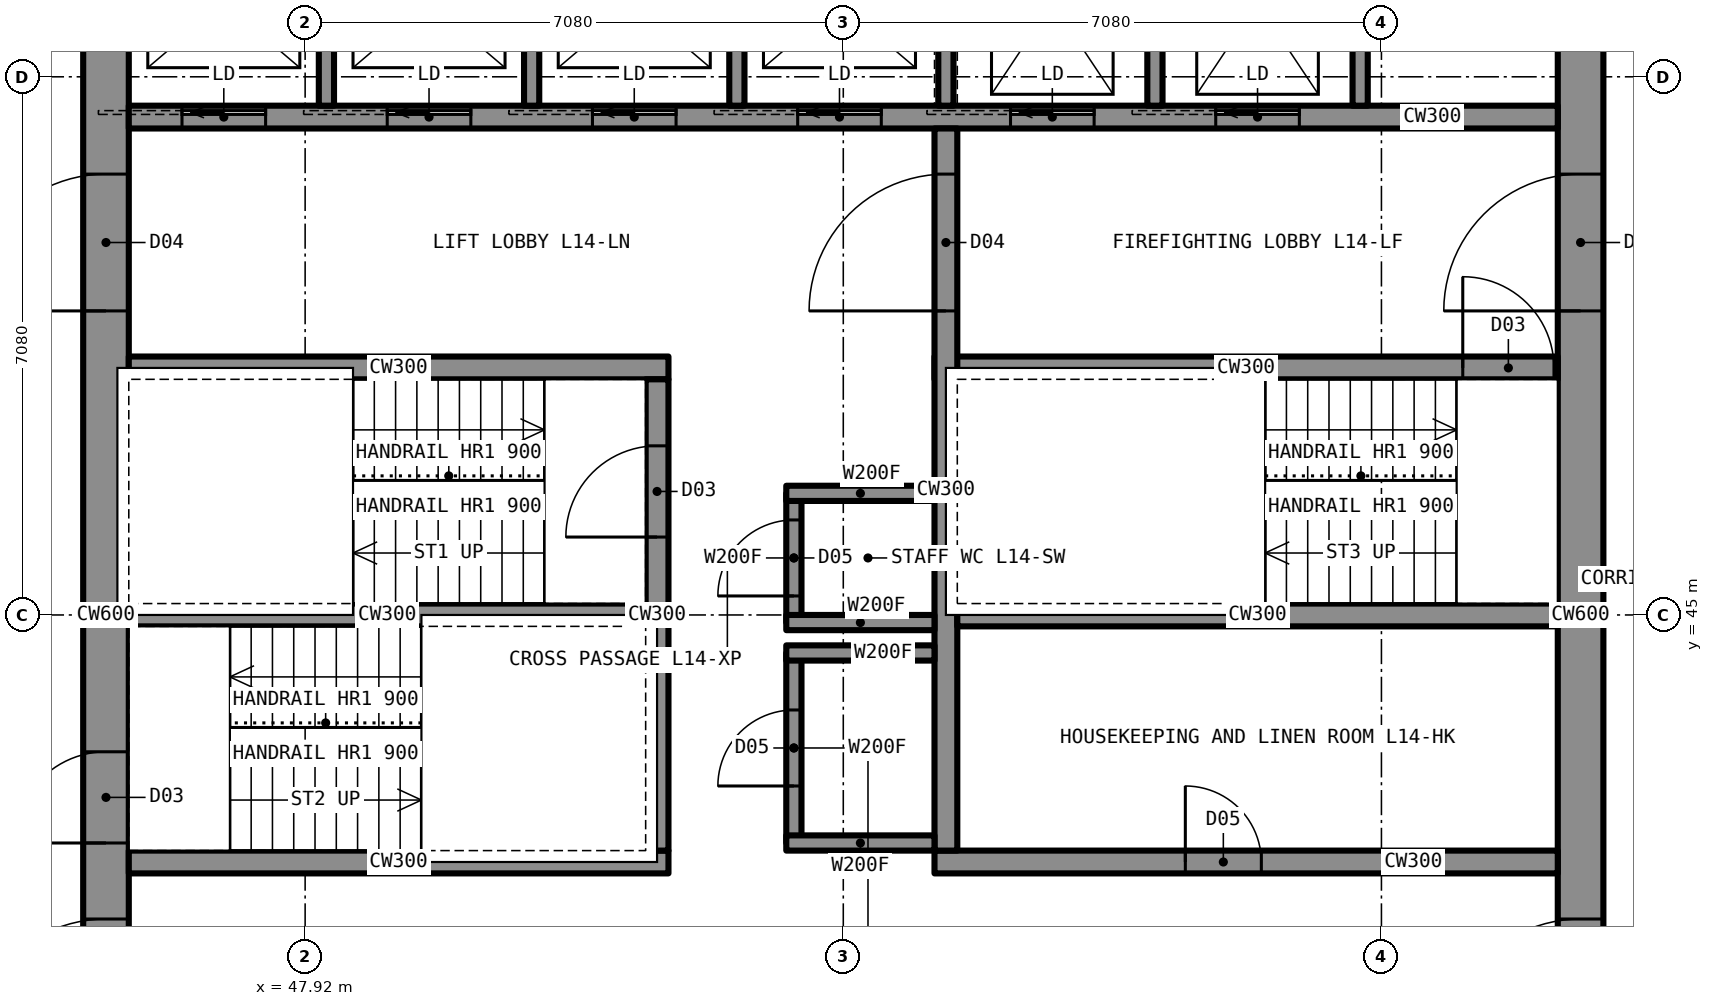
"""IFC4 building model, lengths in metres.
Left out: names, types, materials, properties, quantities, classifications, styles, units other than length and angle.
Written with IfcOpenShell. Run it as: python <this file> out.ifc"""

import sys

from ifc_helpers import new_model, si_unit, direction, frame, frame_2d, origin, place, context, subcontext, project, spatial, rectangle, extrude, element, fill, save


model = new_model("IFC4")
c1 = context("Model", 3, precision=1e-05, world=origin(), true_north=direction((0.0, 1.0)))
c2 = subcontext(c1, "Body", "Model", "MODEL_VIEW")
j1 = project(units=[si_unit("LENGTHUNIT", "METRE"), si_unit("PLANEANGLEUNIT", "RADIAN")], contexts=[c1])
p1 = place(None, origin())
s1 = spatial("IfcSite", under=j1, at=p1, CompositionType="ELEMENT")
p2 = place(p1, origin())
s2 = spatial("IfcBuilding", under=s1, at=p2, CompositionType="ELEMENT")
p3 = place(p2, frame((0.0, 0.0, 49.5)))
s3 = spatial("IfcBuildingStorey", under=s2, at=p3, CompositionType="ELEMENT", Elevation=49.5)
p4 = place(p3, frame((64.7, 35.6, 0.0), z_axis=(0.0, 0.0, 1.0), x_axis=(0.0, 1.0, 0.0)))
e1 = element("IfcWall", 1, at=p4, inside=s3, PredefinedType="SHEAR", context=c2, shape_type="SweptSolid", body=[
    extrude(rectangle(XDim=18.8, YDim=0.6, at=frame_2d((9.4, 0.0))), origin(), (0.0, 0.0, 1.0), 3.5),
])
p5 = place(p4, frame((13.4, 0.0, 0.0)))
e2 = element("IfcOpeningElement", 2, at=p5, cuts=e1, PredefinedType="OPENING", context=c2, shape_type="SweptSolid", body=[
    extrude(rectangle(XDim=1.8, YDim=2.2, at=frame_2d((0.9, 1.1))), frame((0.0, 0.31, 0.0), z_axis=(0.0, -1.0, 0.0), x_axis=(1.0, 0.0, 0.0)), (0.0, 0.0, 1.0), 0.62),
])
p6 = place(p4, frame((3.6, 0.0, 0.0)))
e3 = element("IfcOpeningElement", 3, at=p6, cuts=e1, PredefinedType="OPENING", context=c2, shape_type="SweptSolid", body=[
    extrude(rectangle(XDim=1.8, YDim=2.2, at=frame_2d((0.9, 1.1))), frame((0.0, 0.31, 0.0), z_axis=(0.0, -1.0, 0.0), x_axis=(1.0, 0.0, 0.0)), (0.0, 0.0, 1.0), 0.62),
])
p7 = place(p3, frame((45.3, 35.6, 0.0), z_axis=(0.0, 0.0, 1.0), x_axis=(0.0, 1.0, 0.0)))
e4 = element("IfcWall", 4, at=p7, inside=s3, PredefinedType="SHEAR", context=c2, shape_type="SweptSolid", body=[
    extrude(rectangle(XDim=18.8, YDim=0.6, at=frame_2d((9.4, 0.0))), origin(), (0.0, 0.0, 1.0), 3.5),
])
p8 = place(p7, frame((13.4, 0.0, 0.0)))
e5 = element("IfcOpeningElement", 5, at=p8, cuts=e4, PredefinedType="OPENING", context=c2, shape_type="SweptSolid", body=[
    extrude(rectangle(XDim=1.8, YDim=2.2, at=frame_2d((0.9, 1.1))), frame((0.0, 0.31, 0.0), z_axis=(0.0, -1.0, 0.0), x_axis=(1.0, 0.0, 0.0)), (0.0, 0.0, 1.0), 0.62),
])
p9 = place(p7, frame((3.6, 0.0, 0.0)))
e6 = element("IfcOpeningElement", 6, at=p9, cuts=e4, PredefinedType="OPENING", context=c2, shape_type="SweptSolid", body=[
    extrude(rectangle(XDim=1.8, YDim=2.2, at=frame_2d((0.9, 1.1))), frame((0.0, 0.31, 0.0), z_axis=(0.0, -1.0, 0.0), x_axis=(1.0, 0.0, 0.0)), (0.0, 0.0, 1.0), 0.62),
])
p10 = place(p7, frame((6.4, 0.0, 0.0)))
e7 = element("IfcOpeningElement", 7, at=p10, cuts=e4, PredefinedType="OPENING", context=c2, shape_type="SweptSolid", body=[
    extrude(rectangle(XDim=1.2, YDim=2.2, at=frame_2d((0.6, 1.1))), frame((0.0, 0.31, 0.0), z_axis=(0.0, -1.0, 0.0), x_axis=(1.0, 0.0, 0.0)), (0.0, 0.0, 1.0), 0.62),
])
p11 = place(p3, frame((45.6, 51.55, 0.0), z_axis=(0.0, 0.0, 1.0), x_axis=(1.0, 0.0, 0.0)))
e8 = element("IfcWall", 8, at=p11, inside=s3, PredefinedType="SHEAR", context=c2, shape_type="SweptSolid", body=[
    extrude(rectangle(XDim=18.8, YDim=0.3, at=frame_2d((9.4, 0.0))), origin(), (0.0, 0.0, 1.0), 3.5),
])
p12 = place(p11, frame((0.7, 0.0, 0.0)))
e9 = element("IfcOpeningElement", 9, at=p12, cuts=e8, PredefinedType="OPENING", context=c2, shape_type="SweptSolid", body=[
    extrude(rectangle(XDim=1.1, YDim=2.2, at=frame_2d((0.55, 1.1))), frame((0.0, 0.16, 0.0), z_axis=(0.0, -1.0, 0.0), x_axis=(1.0, 0.0, 0.0)), (0.0, 0.0, 1.0), 0.32),
])
p13 = place(p11, frame((3.4, 0.0, 0.0)))
e10 = element("IfcOpeningElement", 10, at=p13, cuts=e8, PredefinedType="OPENING", context=c2, shape_type="SweptSolid", body=[
    extrude(rectangle(XDim=1.1, YDim=2.2, at=frame_2d((0.55, 1.1))), frame((0.0, 0.16, 0.0), z_axis=(0.0, -1.0, 0.0), x_axis=(1.0, 0.0, 0.0)), (0.0, 0.0, 1.0), 0.32),
])
p14 = place(p11, frame((6.1, 0.0, 0.0)))
e11 = element("IfcOpeningElement", 11, at=p14, cuts=e8, PredefinedType="OPENING", context=c2, shape_type="SweptSolid", body=[
    extrude(rectangle(XDim=1.1, YDim=2.2, at=frame_2d((0.55, 1.1))), frame((0.0, 0.16, 0.0), z_axis=(0.0, -1.0, 0.0), x_axis=(1.0, 0.0, 0.0)), (0.0, 0.0, 1.0), 0.32),
])
p15 = place(p11, frame((8.8, 0.0, 0.0)))
e12 = element("IfcOpeningElement", 12, at=p15, cuts=e8, PredefinedType="OPENING", context=c2, shape_type="SweptSolid", body=[
    extrude(rectangle(XDim=1.1, YDim=2.2, at=frame_2d((0.55, 1.1))), frame((0.0, 0.16, 0.0), z_axis=(0.0, -1.0, 0.0), x_axis=(1.0, 0.0, 0.0)), (0.0, 0.0, 1.0), 0.32),
])
p16 = place(p11, frame((11.6, 0.0, 0.0)))
e13 = element("IfcOpeningElement", 13, at=p16, cuts=e8, PredefinedType="OPENING", context=c2, shape_type="SweptSolid", body=[
    extrude(rectangle(XDim=1.1, YDim=2.2, at=frame_2d((0.55, 1.1))), frame((0.0, 0.16, 0.0), z_axis=(0.0, -1.0, 0.0), x_axis=(1.0, 0.0, 0.0)), (0.0, 0.0, 1.0), 0.32),
])
p17 = place(p11, frame((14.3, 0.0, 0.0)))
e14 = element("IfcOpeningElement", 14, at=p17, cuts=e8, PredefinedType="OPENING", context=c2, shape_type="SweptSolid", body=[
    extrude(rectangle(XDim=1.1, YDim=2.2, at=frame_2d((0.55, 1.1))), frame((0.0, 0.16, 0.0), z_axis=(0.0, -1.0, 0.0), x_axis=(1.0, 0.0, 0.0)), (0.0, 0.0, 1.0), 0.32),
])
p18 = place(p3, frame((45.6, 48.25, 0.0), z_axis=(0.0, 0.0, 1.0), x_axis=(1.0, 0.0, 0.0)))
e15 = element("IfcWall", 15, at=p18, inside=s3, PredefinedType="SHEAR", context=c2, shape_type="SweptSolid", body=[
    extrude(rectangle(XDim=7.1, YDim=0.3, at=frame_2d((3.55, 0.0))), origin(), (0.0, 0.0, 1.0), 3.5),
])
p19 = place(p3, frame((56.2, 48.25, 0.0), z_axis=(0.0, 0.0, 1.0), x_axis=(1.0, 0.0, 0.0)))
e16 = element("IfcWall", 16, at=p19, inside=s3, PredefinedType="SHEAR", context=c2, shape_type="SweptSolid", body=[
    extrude(rectangle(XDim=8.2, YDim=0.3, at=frame_2d((4.1, 0.0))), origin(), (0.0, 0.0, 1.0), 3.5),
])
p20 = place(p19, frame((6.95, 0.0, 0.0)))
e17 = element("IfcOpeningElement", 17, at=p20, cuts=e16, PredefinedType="OPENING", context=c2, shape_type="SweptSolid", body=[
    extrude(rectangle(XDim=1.2, YDim=2.2, at=frame_2d((0.6, 1.1))), frame((0.0, 0.16, 0.0), z_axis=(0.0, -1.0, 0.0), x_axis=(1.0, 0.0, 0.0)), (0.0, 0.0, 1.0), 0.32),
])
p21 = place(p3, frame((45.6, 41.75, 0.0), z_axis=(0.0, 0.0, 1.0), x_axis=(1.0, 0.0, 0.0)))
e18 = element("IfcWall", 18, at=p21, inside=s3, PredefinedType="SHEAR", context=c2, shape_type="SweptSolid", body=[
    extrude(rectangle(XDim=7.1, YDim=0.3, at=frame_2d((3.55, 0.0))), origin(), (0.0, 0.0, 1.0), 3.5),
])
p22 = place(p3, frame((56.2, 41.75, 0.0), z_axis=(0.0, 0.0, 1.0), x_axis=(1.0, 0.0, 0.0)))
e19 = element("IfcWall", 19, at=p22, inside=s3, PredefinedType="SHEAR", context=c2, shape_type="SweptSolid", body=[
    extrude(rectangle(XDim=8.2, YDim=0.3, at=frame_2d((4.1, 0.0))), origin(), (0.0, 0.0, 1.0), 3.5),
])
p23 = place(p22, frame((3.3, 0.0, 0.0)))
e20 = element("IfcOpeningElement", 20, at=p23, cuts=e19, PredefinedType="OPENING", context=c2, shape_type="SweptSolid", body=[
    extrude(rectangle(XDim=1.0, YDim=2.1, at=frame_2d((0.5, 1.05))), frame((0.0, 0.16, 0.0), z_axis=(0.0, -1.0, 0.0), x_axis=(1.0, 0.0, 0.0)), (0.0, 0.0, 1.0), 0.32),
])
p24 = place(p3, frame((52.55, 41.9, 0.0), z_axis=(0.0, 0.0, 1.0), x_axis=(0.0, 1.0, 0.0)))
e21 = element("IfcWall", 21, at=p24, inside=s3, PredefinedType="SHEAR", context=c2, shape_type="SweptSolid", body=[
    extrude(rectangle(XDim=6.2, YDim=0.3, at=frame_2d((3.1, 0.0))), origin(), (0.0, 0.0, 1.0), 3.5),
])
p25 = place(p24, frame((4.125, 0.0, 0.0)))
e22 = element("IfcOpeningElement", 22, at=p25, cuts=e21, PredefinedType="OPENING", context=c2, shape_type="SweptSolid", body=[
    extrude(rectangle(XDim=1.2, YDim=2.2, at=frame_2d((0.6, 1.1))), frame((0.0, 0.16, 0.0), z_axis=(0.0, -1.0, 0.0), x_axis=(1.0, 0.0, 0.0)), (0.0, 0.0, 1.0), 0.32),
])
p26 = place(p3, frame((56.35, 41.9, 0.0), z_axis=(0.0, 0.0, 1.0), x_axis=(0.0, 1.0, 0.0)))
e23 = element("IfcWall", 23, at=p26, inside=s3, PredefinedType="SHEAR", context=c2, shape_type="SweptSolid", body=[
    extrude(rectangle(XDim=9.5, YDim=0.3, at=frame_2d((4.75, 0.0))), origin(), (0.0, 0.0, 1.0), 3.5),
])
p27 = place(p26, frame((7.1, 0.0, 0.0)))
e24 = element("IfcOpeningElement", 24, at=p27, cuts=e23, PredefinedType="OPENING", context=c2, shape_type="SweptSolid", body=[
    extrude(rectangle(XDim=1.8, YDim=2.2, at=frame_2d((0.9, 1.1))), frame((0.0, 0.16, 0.0), z_axis=(0.0, -1.0, 0.0), x_axis=(1.0, 0.0, 0.0)), (0.0, 0.0, 1.0), 0.32),
])
p28 = place(p3, frame((45.6, 45.0, 0.0), z_axis=(0.0, 0.0, 1.0), x_axis=(1.0, 0.0, 0.0)))
e25 = element("IfcWall", 25, at=p28, inside=s3, PredefinedType="SHEAR", context=c2, shape_type="SweptSolid", body=[
    extrude(rectangle(XDim=6.8, YDim=0.3, at=frame_2d((3.4, 0.0))), origin(), (0.0, 0.0, 1.0), 3.5),
])
p29 = place(p3, frame((56.5, 45.0, 0.0), z_axis=(0.0, 0.0, 1.0), x_axis=(1.0, 0.0, 0.0)))
e26 = element("IfcWall", 26, at=p29, inside=s3, PredefinedType="SHEAR", context=c2, shape_type="SweptSolid", body=[
    extrude(rectangle(XDim=7.9, YDim=0.3, at=frame_2d((3.95, 0.0))), origin(), (0.0, 0.0, 1.0), 3.5),
])
p30 = place(p3, frame((54.65, 42.0, 0.0), z_axis=(0.0, 0.0, 1.0), x_axis=(0.0, 1.0, 0.0)))
e27 = element("IfcWall", 27, at=p30, inside=s3, PredefinedType="PARTITIONING", context=c2, shape_type="SweptSolid", body=[
    extrude(rectangle(XDim=1.3, YDim=0.2, at=frame_2d((0.65, 0.0))), origin(), (0.0, 0.0, 1.0), 3.33),
])
p31 = place(p30, frame((0.15, 0.0, 0.0)))
e28 = element("IfcOpeningElement", 28, at=p31, cuts=e27, PredefinedType="OPENING", context=c2, shape_type="SweptSolid", body=[
    extrude(rectangle(XDim=1.0, YDim=2.1, at=frame_2d((0.5, 1.05))), frame((0.0, 0.11, 0.0), z_axis=(0.0, -1.0, 0.0), x_axis=(1.0, 0.0, 0.0)), (0.0, 0.0, 1.0), 0.22),
])
for number, where, z_axis, x_axis in (
    (29, (54.55, 42.0, 0.0), (0.0, 0.0, 1.0), (1.0, 0.0, 0.0)),
    (30, (54.55, 43.3, 0.0), (0.0, 0.0, 1.0), (1.0, 0.0, 0.0)),
):
    element("IfcWall", number, at=place(p3, frame(where, z_axis=z_axis, x_axis=x_axis)), inside=s3, PredefinedType="PARTITIONING", context=c2, shape_type="SweptSolid", body=[
        extrude(rectangle(XDim=1.65, YDim=0.2, at=frame_2d((0.825, 0.0))), origin(), (0.0, 0.0, 1.0), 3.33),
    ])
p32 = place(p3, frame((54.65, 43.7, 0.0), z_axis=(0.0, 0.0, 1.0), x_axis=(0.0, 1.0, 0.0)))
e31 = element("IfcWall", 31, at=p32, inside=s3, PredefinedType="PARTITIONING", context=c2, shape_type="SweptSolid", body=[
    extrude(rectangle(XDim=2.2, YDim=0.2, at=frame_2d((1.1, 0.0))), origin(), (0.0, 0.0, 1.0), 3.33),
])
p33 = place(p32, frame((0.6, 0.0, 0.0)))
e32 = element("IfcOpeningElement", 32, at=p33, cuts=e31, PredefinedType="OPENING", context=c2, shape_type="SweptSolid", body=[
    extrude(rectangle(XDim=1.0, YDim=2.1, at=frame_2d((0.5, 1.05))), frame((0.0, 0.11, 0.0), z_axis=(0.0, -1.0, 0.0), x_axis=(1.0, 0.0, 0.0)), (0.0, 0.0, 1.0), 0.22),
])
for number, where, z_axis, x_axis in (
    (33, (54.55, 43.7, 0.0), (0.0, 0.0, 1.0), (1.0, 0.0, 0.0)),
    (34, (54.55, 45.9, 0.0), (0.0, 0.0, 1.0), (1.0, 0.0, 0.0)),
):
    element("IfcWall", number, at=place(p3, frame(where, z_axis=z_axis, x_axis=x_axis)), inside=s3, PredefinedType="PARTITIONING", context=c2, shape_type="SweptSolid", body=[
        extrude(rectangle(XDim=1.65, YDim=0.2, at=frame_2d((0.825, 0.0))), origin(), (0.0, 0.0, 1.0), 3.33),
    ])
p34 = place(p3, frame((54.65, 46.3, 0.0), z_axis=(0.0, 0.0, 1.0), x_axis=(0.0, 1.0, 0.0)))
e35 = element("IfcWall", 35, at=p34, inside=s3, PredefinedType="PARTITIONING", context=c2, shape_type="SweptSolid", body=[
    extrude(rectangle(XDim=1.7, YDim=0.2, at=frame_2d((0.85, 0.0))), origin(), (0.0, 0.0, 1.0), 3.33),
])
p35 = place(p34, frame((0.35, 0.0, 0.0)))
e36 = element("IfcOpeningElement", 36, at=p35, cuts=e35, PredefinedType="OPENING", context=c2, shape_type="SweptSolid", body=[
    extrude(rectangle(XDim=1.0, YDim=2.1, at=frame_2d((0.5, 1.05))), frame((0.0, 0.11, 0.0), z_axis=(0.0, -1.0, 0.0), x_axis=(1.0, 0.0, 0.0)), (0.0, 0.0, 1.0), 0.22),
])
for number, where, z_axis, x_axis in (
    (37, (54.55, 46.3, 0.0), (0.0, 0.0, 1.0), (1.0, 0.0, 0.0)),
    (38, (54.55, 48.0, 0.0), (0.0, 0.0, 1.0), (1.0, 0.0, 0.0)),
):
    element("IfcWall", number, at=place(p3, frame(where, z_axis=z_axis, x_axis=x_axis)), inside=s3, PredefinedType="PARTITIONING", context=c2, shape_type="SweptSolid", body=[
        extrude(rectangle(XDim=1.65, YDim=0.2, at=frame_2d((0.825, 0.0))), origin(), (0.0, 0.0, 1.0), 3.33),
    ])
for number, where, z_axis, x_axis in (
    (39, (48.2, 51.7, 0.0), (0.0, 0.0, 1.0), (0.0, 1.0, 0.0)),
    (40, (50.9, 51.7, 0.0), (0.0, 0.0, 1.0), (0.0, 1.0, 0.0)),
    (41, (53.6, 51.7, 0.0), (0.0, 0.0, 1.0), (0.0, 1.0, 0.0)),
    (42, (59.1, 51.7, 0.0), (0.0, 0.0, 1.0), (0.0, 1.0, 0.0)),
    (43, (61.8, 51.7, 0.0), (0.0, 0.0, 1.0), (0.0, 1.0, 0.0)),
    (44, (56.35, 51.7, 0.0), (0.0, 0.0, 1.0), (0.0, 1.0, 0.0)),
):
    element("IfcWall", number, at=place(p3, frame(where, z_axis=z_axis, x_axis=x_axis)), inside=s3, PredefinedType="PARTITIONING", context=c2, shape_type="SweptSolid", body=[
        extrude(rectangle(XDim=2.7, YDim=0.2, at=frame_2d((1.35, 0.0))), origin(), (0.0, 0.0, 1.0), 3.33),
    ])
p36 = place(p31, origin())
e45 = element("IfcDoor", 45, at=p36, inside=s3, OperationType="SINGLE_SWING_LEFT", PredefinedType="DOOR", context=c2, shape_type="SweptSolid", body=[
    extrude(rectangle(XDim=1.0, YDim=2.1, at=frame_2d((0.5, 1.05))), frame((0.0, 0.025, 0.0), z_axis=(0.0, -1.0, 0.0), x_axis=(1.0, 0.0, 0.0)), (0.0, 0.0, 1.0), 0.05),
])
fill(e28, e45)
p37 = place(p33, origin())
e46 = element("IfcDoor", 46, at=p37, inside=s3, OperationType="SINGLE_SWING_LEFT", PredefinedType="DOOR", context=c2, shape_type="SweptSolid", body=[
    extrude(rectangle(XDim=1.0, YDim=2.1, at=frame_2d((0.5, 1.05))), frame((0.0, 0.025, 0.0), z_axis=(0.0, -1.0, 0.0), x_axis=(1.0, 0.0, 0.0)), (0.0, 0.0, 1.0), 0.05),
])
fill(e32, e46)
p38 = place(p35, origin())
e47 = element("IfcDoor", 47, at=p38, inside=s3, OperationType="SINGLE_SWING_LEFT", PredefinedType="DOOR", context=c2, shape_type="SweptSolid", body=[
    extrude(rectangle(XDim=1.0, YDim=2.1, at=frame_2d((0.5, 1.05))), frame((0.0, 0.025, 0.0), z_axis=(0.0, -1.0, 0.0), x_axis=(1.0, 0.0, 0.0)), (0.0, 0.0, 1.0), 0.05),
])
fill(e36, e47)
p39 = place(p8, origin())
e48 = element("IfcDoor", 48, at=p39, inside=s3, OperationType="DOUBLE_DOOR_SINGLE_SWING", PredefinedType="DOOR", context=c2, shape_type="SweptSolid", body=[
    extrude(rectangle(XDim=1.8, YDim=2.2, at=frame_2d((0.9, 1.1))), frame((0.0, 0.025, 0.0), z_axis=(0.0, -1.0, 0.0), x_axis=(1.0, 0.0, 0.0)), (0.0, 0.0, 1.0), 0.05),
])
fill(e5, e48)
p40 = place(p9, origin())
e49 = element("IfcDoor", 49, at=p40, inside=s3, OperationType="DOUBLE_DOOR_SINGLE_SWING", PredefinedType="DOOR", context=c2, shape_type="SweptSolid", body=[
    extrude(rectangle(XDim=1.8, YDim=2.2, at=frame_2d((0.9, 1.1))), frame((0.0, 0.025, 0.0), z_axis=(0.0, -1.0, 0.0), x_axis=(1.0, 0.0, 0.0)), (0.0, 0.0, 1.0), 0.05),
])
fill(e6, e49)
p41 = place(p5, origin())
e50 = element("IfcDoor", 50, at=p41, inside=s3, OperationType="DOUBLE_DOOR_SINGLE_SWING", PredefinedType="DOOR", context=c2, shape_type="SweptSolid", body=[
    extrude(rectangle(XDim=1.8, YDim=2.2, at=frame_2d((0.9, 1.1))), frame((0.0, 0.025, 0.0), z_axis=(0.0, -1.0, 0.0), x_axis=(1.0, 0.0, 0.0)), (0.0, 0.0, 1.0), 0.05),
])
fill(e2, e50)
p42 = place(p6, origin())
e51 = element("IfcDoor", 51, at=p42, inside=s3, OperationType="DOUBLE_DOOR_SINGLE_SWING", PredefinedType="DOOR", context=c2, shape_type="SweptSolid", body=[
    extrude(rectangle(XDim=1.8, YDim=2.2, at=frame_2d((0.9, 1.1))), frame((0.0, 0.025, 0.0), z_axis=(0.0, -1.0, 0.0), x_axis=(1.0, 0.0, 0.0)), (0.0, 0.0, 1.0), 0.05),
])
fill(e3, e51)
p43 = place(p27, origin())
e52 = element("IfcDoor", 52, at=p43, inside=s3, OperationType="DOUBLE_DOOR_SINGLE_SWING", PredefinedType="DOOR", context=c2, shape_type="SweptSolid", body=[
    extrude(rectangle(XDim=1.8, YDim=2.2, at=frame_2d((0.9, 1.1))), frame((0.0, 0.025, 0.0), z_axis=(0.0, -1.0, 0.0), x_axis=(1.0, 0.0, 0.0)), (0.0, 0.0, 1.0), 0.05),
])
fill(e24, e52)
p44 = place(p25, origin())
e53 = element("IfcDoor", 53, at=p44, inside=s3, OperationType="SINGLE_SWING_LEFT", PredefinedType="DOOR", context=c2, shape_type="SweptSolid", body=[
    extrude(rectangle(XDim=1.2, YDim=2.2, at=frame_2d((0.6, 1.1))), frame((0.0, 0.025, 0.0), z_axis=(0.0, -1.0, 0.0), x_axis=(1.0, 0.0, 0.0)), (0.0, 0.0, 1.0), 0.05),
])
fill(e22, e53)
p45 = place(p10, origin())
e54 = element("IfcDoor", 54, at=p45, inside=s3, OperationType="SINGLE_SWING_LEFT", PredefinedType="DOOR", context=c2, shape_type="SweptSolid", body=[
    extrude(rectangle(XDim=1.2, YDim=2.2, at=frame_2d((0.6, 1.1))), frame((0.0, 0.025, 0.0), z_axis=(0.0, -1.0, 0.0), x_axis=(1.0, 0.0, 0.0)), (0.0, 0.0, 1.0), 0.05),
])
fill(e7, e54)
p46 = place(p20, origin())
e55 = element("IfcDoor", 55, at=p46, inside=s3, OperationType="SINGLE_SWING_LEFT", PredefinedType="DOOR", context=c2, shape_type="SweptSolid", body=[
    extrude(rectangle(XDim=1.2, YDim=2.2, at=frame_2d((0.6, 1.1))), frame((0.0, 0.025, 0.0), z_axis=(0.0, -1.0, 0.0), x_axis=(1.0, 0.0, 0.0)), (0.0, 0.0, 1.0), 0.05),
])
fill(e17, e55)
p47 = place(p23, origin())
e56 = element("IfcDoor", 56, at=p47, inside=s3, OperationType="SINGLE_SWING_LEFT", PredefinedType="DOOR", context=c2, shape_type="SweptSolid", body=[
    extrude(rectangle(XDim=1.0, YDim=2.1, at=frame_2d((0.5, 1.05))), frame((0.0, 0.025, 0.0), z_axis=(0.0, -1.0, 0.0), x_axis=(1.0, 0.0, 0.0)), (0.0, 0.0, 1.0), 0.05),
])
fill(e20, e56)
p48 = place(p12, origin())
e57 = element("IfcDoor", 57, at=p48, inside=s3, OperationType="SLIDING_TO_LEFT", PredefinedType="DOOR", context=c2, shape_type="SweptSolid", body=[
    extrude(rectangle(XDim=1.1, YDim=2.2, at=frame_2d((0.55, 1.1))), frame((0.0, 0.025, 0.0), z_axis=(0.0, -1.0, 0.0), x_axis=(1.0, 0.0, 0.0)), (0.0, 0.0, 1.0), 0.05),
])
fill(e9, e57)
p49 = place(p13, origin())
e58 = element("IfcDoor", 58, at=p49, inside=s3, OperationType="SLIDING_TO_LEFT", PredefinedType="DOOR", context=c2, shape_type="SweptSolid", body=[
    extrude(rectangle(XDim=1.1, YDim=2.2, at=frame_2d((0.55, 1.1))), frame((0.0, 0.025, 0.0), z_axis=(0.0, -1.0, 0.0), x_axis=(1.0, 0.0, 0.0)), (0.0, 0.0, 1.0), 0.05),
])
fill(e10, e58)
p50 = place(p14, origin())
e59 = element("IfcDoor", 59, at=p50, inside=s3, OperationType="SLIDING_TO_LEFT", PredefinedType="DOOR", context=c2, shape_type="SweptSolid", body=[
    extrude(rectangle(XDim=1.1, YDim=2.2, at=frame_2d((0.55, 1.1))), frame((0.0, 0.025, 0.0), z_axis=(0.0, -1.0, 0.0), x_axis=(1.0, 0.0, 0.0)), (0.0, 0.0, 1.0), 0.05),
])
fill(e11, e59)
p51 = place(p15, origin())
e60 = element("IfcDoor", 60, at=p51, inside=s3, OperationType="SLIDING_TO_LEFT", PredefinedType="DOOR", context=c2, shape_type="SweptSolid", body=[
    extrude(rectangle(XDim=1.1, YDim=2.2, at=frame_2d((0.55, 1.1))), frame((0.0, 0.025, 0.0), z_axis=(0.0, -1.0, 0.0), x_axis=(1.0, 0.0, 0.0)), (0.0, 0.0, 1.0), 0.05),
])
fill(e12, e60)
p52 = place(p16, origin())
e61 = element("IfcDoor", 61, at=p52, inside=s3, OperationType="SLIDING_TO_LEFT", PredefinedType="DOOR", context=c2, shape_type="SweptSolid", body=[
    extrude(rectangle(XDim=1.1, YDim=2.2, at=frame_2d((0.55, 1.1))), frame((0.0, 0.025, 0.0), z_axis=(0.0, -1.0, 0.0), x_axis=(1.0, 0.0, 0.0)), (0.0, 0.0, 1.0), 0.05),
])
fill(e13, e61)
p53 = place(p17, origin())
e62 = element("IfcDoor", 62, at=p53, inside=s3, OperationType="SLIDING_TO_LEFT", PredefinedType="DOOR", context=c2, shape_type="SweptSolid", body=[
    extrude(rectangle(XDim=1.1, YDim=2.2, at=frame_2d((0.55, 1.1))), frame((0.0, 0.025, 0.0), z_axis=(0.0, -1.0, 0.0), x_axis=(1.0, 0.0, 0.0)), (0.0, 0.0, 1.0), 0.05),
])
fill(e14, e62)
save(model, sys.argv[1])
